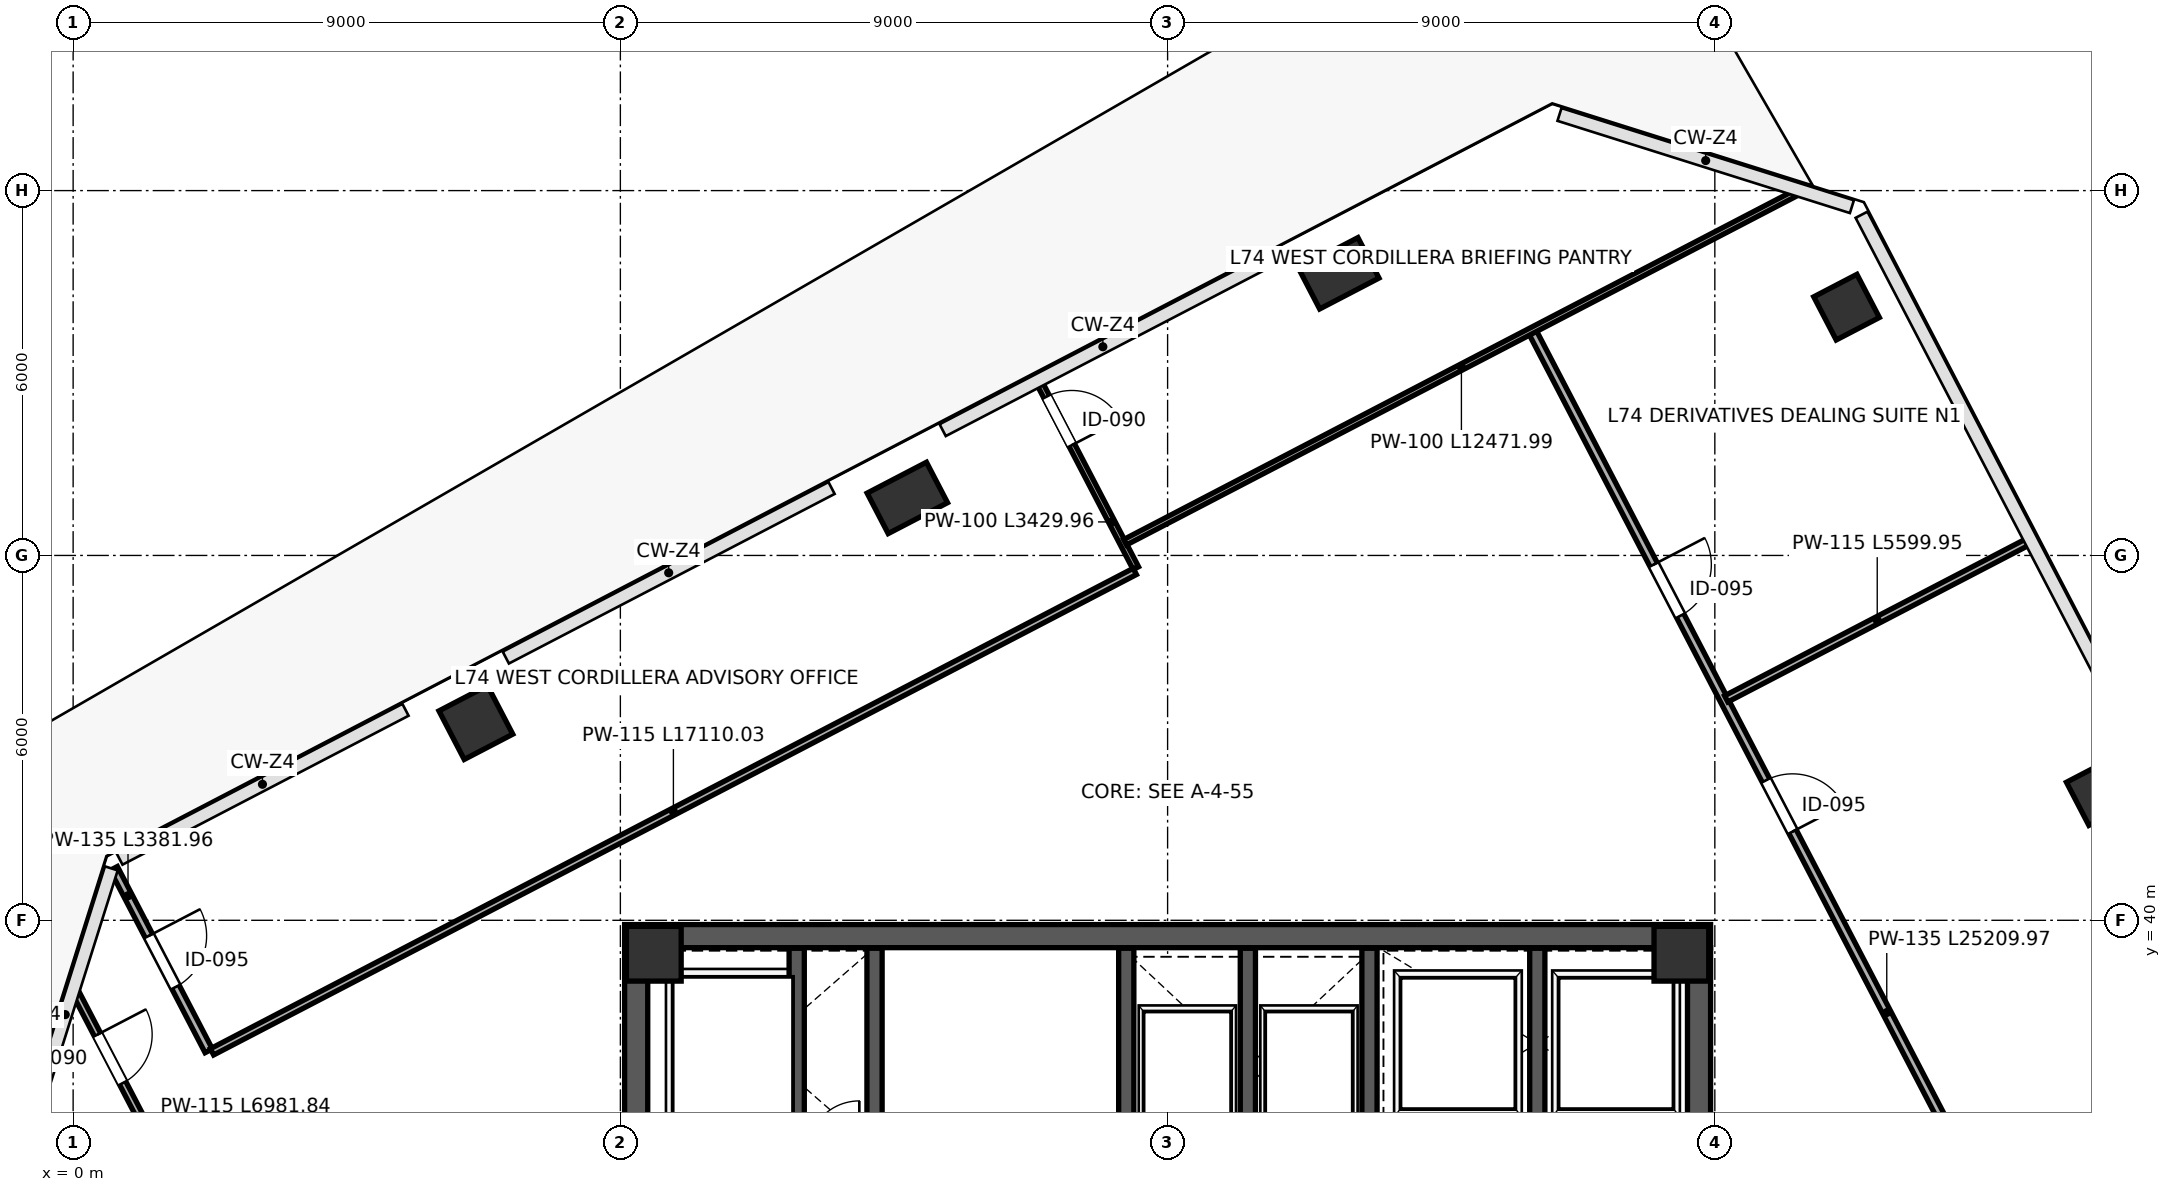
"""IFC4 building model, lengths in metres.
Left out: names, types, materials, properties, quantities, classifications, styles, units other than length and angle.
Written with IfcOpenShell. Run it as: python <this file> out.ifc"""

import sys

from ifc_helpers import new_model, si_unit, direction, frame, frame_2d, origin, origin_2d, place, context, subcontext, project, spatial, rectangle, extrude, source, transform, mapped, element, fill, save


model = new_model("IFC4")
c1 = context("Model", 3, precision=1e-05, world=origin(), true_north=direction((0.0, 1.0)))
c2 = subcontext(c1, "Body", "Model", "MODEL_VIEW")
j1 = project(units=[si_unit("LENGTHUNIT", "METRE"), si_unit("PLANEANGLEUNIT", "RADIAN")], contexts=[c1])
p1 = place(None, origin())
s1 = spatial("IfcSite", under=j1, at=p1, CompositionType="ELEMENT")
p2 = place(p1, origin())
s2 = spatial("IfcBuilding", under=s1, at=p2, CompositionType="ELEMENT")
p3 = place(p2, frame((0.0, 0.0, 328.2)))
s3 = spatial("IfcBuildingStorey", under=s2, at=p3, CompositionType="ELEMENT", Elevation=328.2)
m1 = source(origin(), c2, "Body", "SweptSolid", [
    extrude(rectangle(XDim=0.9, YDim=0.9, at=origin_2d()), origin(), (0.0, 0.0, 1.0), 4.198),
])
for number, where, z_axis, x_axis in (
    (1, (9.55, 39.45, 0.001), (0.0, 0.0, 1.0), (1.0, 0.0, 0.0)),
    (2, (26.45, 39.45, 0.001), (0.0, 0.0, 1.0), (1.0, 0.0, 0.0)),
):
    element("IfcColumn", number, at=place(p3, frame(where, z_axis=z_axis, x_axis=x_axis)), inside=s3, PredefinedType="COLUMN", context=c2, shape_type="MappedRepresentation", body=[
        mapped(m1, transform((0.0, 0.0, 0.0), scale=1.0)),
    ])
m2 = source(origin(), c2, "Body", "SweptSolid", [
    extrude(rectangle(XDim=0.8, YDim=0.8, at=origin_2d()), origin(), (0.0, 0.0, 1.0), 4.198),
])
for number, where, z_axis, x_axis in (
    (3, (29.167, 50.083, 0.001), (0.0, 0.0, 1.0), (-0.462, 0.887, 0.0)),
    (4, (33.322, 42.1, 0.001), (0.0, 0.0, 1.0), (-0.462, 0.887, 0.0)),
):
    element("IfcColumn", number, at=place(p3, frame(where, z_axis=z_axis, x_axis=x_axis)), inside=s3, PredefinedType="COLUMN", context=c2, shape_type="MappedRepresentation", body=[
        mapped(m2, transform((0.0, 0.0, 0.0), scale=1.0)),
    ])
m3 = source(origin(), c2, "Body", "SweptSolid", [
    extrude(rectangle(XDim=0.9, YDim=0.9, at=origin_2d()), origin(), (0.0, 0.0, 1.0), 4.198),
])
p4 = place(p3, frame((6.623, 43.252, 0.001), z_axis=(0.0, 0.0, 1.0), x_axis=(-0.461748613235, 0.887010833178, 0.0)))
e5 = element("IfcColumn", 5, at=p4, inside=s3, PredefinedType="COLUMN", context=c2, shape_type="MappedRepresentation", body=[
    mapped(m3, transform((0.0, 0.0, 0.0), scale=1.0)),
])
m4 = source(origin(), c2, "Body", "SweptSolid", [
    extrude(rectangle(XDim=0.75, YDim=1.1, at=origin_2d()), origin(), (0.0, 0.0, 1.0), 4.198),
])
for number, where, z_axis, x_axis in (
    (6, (13.719, 46.946, 0.001), (0.0, 0.0, 1.0), (-0.462, 0.887, 0.0)),
    (7, (20.816, 50.64, 0.001), (0.0, 0.0, 1.0), (-0.462, 0.887, 0.0)),
):
    element("IfcColumn", number, at=place(p3, frame(where, z_axis=z_axis, x_axis=x_axis)), inside=s3, PredefinedType="PILASTER", context=c2, shape_type="MappedRepresentation", body=[
        mapped(m4, transform((0.0, 0.0, 0.0), scale=1.0)),
    ])
p5 = place(p3, frame((9.26, 24.45, 0.0), z_axis=(0.0, 0.0, 1.0), x_axis=(0.0, 1.0, 0.0)))
e8 = element("IfcWall", 8, at=p5, inside=s3, PredefinedType="SHEAR", context=c2, shape_type="SweptSolid", body=[
    extrude(rectangle(XDim=15.1, YDim=0.38, at=frame_2d((7.55, 0.0))), origin(), (0.0, 0.0, 1.0), 3.96),
])
p6 = place(p5, frame((8.7, 0.0, 0.0)))
e9 = element("IfcOpeningElement", 9, at=p6, cuts=e8, PredefinedType="OPENING", context=c2, shape_type="SweptSolid", body=[
    extrude(rectangle(XDim=1.15, YDim=2.2, at=frame_2d((0.575, 1.1))), frame((0.0, 0.2, 0.0), z_axis=(0.0, -1.0, 0.0), x_axis=(1.0, 0.0, 0.0)), (0.0, 0.0, 1.0), 0.4),
])
p7 = place(p3, frame((26.74, 24.45, 0.0), z_axis=(0.0, 0.0, 1.0), x_axis=(0.0, 1.0, 0.0)))
e10 = element("IfcWall", 10, at=p7, inside=s3, PredefinedType="SHEAR", context=c2, shape_type="SweptSolid", body=[
    extrude(rectangle(XDim=15.1, YDim=0.38, at=frame_2d((7.55, 0.0))), origin(), (0.0, 0.0, 1.0), 3.96),
])
p8 = place(p7, frame((8.6, 0.0, 0.0)))
e11 = element("IfcOpeningElement", 11, at=p8, cuts=e10, PredefinedType="OPENING", context=c2, shape_type="SweptSolid", body=[
    extrude(rectangle(XDim=1.15, YDim=2.2, at=frame_2d((0.575, 1.1))), frame((0.0, 0.2, 0.0), z_axis=(0.0, -1.0, 0.0), x_axis=(1.0, 0.0, 0.0)), (0.0, 0.0, 1.0), 0.4),
])
p9 = place(p3, frame((9.07, 39.74, 0.0), z_axis=(0.0, 0.0, 1.0), x_axis=(1.0, 0.0, 0.0)))
e12 = element("IfcWall", 12, at=p9, inside=s3, PredefinedType="SHEAR", context=c2, shape_type="SweptSolid", body=[
    extrude(rectangle(XDim=17.86, YDim=0.38, at=frame_2d((8.93, 0.0))), origin(), (0.0, 0.0, 1.0), 3.96),
])
p10 = place(p3, frame((21.32, 32.12, 0.0), z_axis=(0.0, 0.0, 1.0), x_axis=(0.0, 1.0, 0.0)))
e13 = element("IfcWall", 13, at=p10, inside=s3, PredefinedType="SHEAR", context=c2, shape_type="SweptSolid", body=[
    extrude(rectangle(XDim=7.42, YDim=0.25, at=frame_2d((3.71, 0.0))), origin(), (0.0, 0.0, 1.0), 3.96),
])
p11 = place(p10, frame((1.4, 0.0, 0.0)))
e14 = element("IfcOpeningElement", 14, at=p11, cuts=e13, PredefinedType="OPENING", context=c2, shape_type="SweptSolid", body=[
    extrude(rectangle(XDim=1.15, YDim=2.2, at=frame_2d((0.575, 1.1))), frame((0.0, 0.135, 0.0), z_axis=(0.0, -1.0, 0.0), x_axis=(1.0, 0.0, 0.0)), (0.0, 0.0, 1.0), 0.27),
])
p12 = place(p3, frame((11.9, 36.31, 0.0), z_axis=(0.0, 0.0, 1.0), x_axis=(0.0, 1.0, 0.0)))
e15 = element("IfcWall", 15, at=p12, inside=s3, PredefinedType="SHEAR", context=c2, shape_type="SweptSolid", body=[
    extrude(rectangle(XDim=3.23, YDim=0.25, at=frame_2d((1.615, 0.0))), origin(), (0.0, 0.0, 1.0), 3.96),
])
p13 = place(p3, frame((24.08, 36.48, 0.0), z_axis=(0.0, 0.0, 1.0), x_axis=(0.0, 1.0, 0.0)))
e16 = element("IfcWall", 16, at=p13, inside=s3, PredefinedType="SHEAR", context=c2, shape_type="SweptSolid", body=[
    extrude(rectangle(XDim=3.06, YDim=0.25, at=frame_2d((1.53, 0.0))), origin(), (0.0, 0.0, 1.0), 3.96),
])
p14 = place(p3, frame((13.18, 36.2, 0.0), z_axis=(0.0, 0.0, 1.0), x_axis=(0.0, 1.0, 0.0)))
e17 = element("IfcWall", 17, at=p14, inside=s3, PredefinedType="SHEAR", context=c2, shape_type="SweptSolid", body=[
    extrude(rectangle(XDim=3.34, YDim=0.25, at=frame_2d((1.67, 0.0))), origin(), (0.0, 0.0, 1.0), 3.96),
])
for number, where, z_axis, x_axis in (
    (18, (17.32, 35.81, 0.0), (0.0, 0.0, 1.0), (0.0, 1.0, 0.0)),
    (19, (19.32, 35.81, 0.0), (0.0, 0.0, 1.0), (0.0, 1.0, 0.0)),
):
    element("IfcWall", number, at=place(p3, frame(where, z_axis=z_axis, x_axis=x_axis)), inside=s3, PredefinedType="SHEAR", context=c2, shape_type="SweptSolid", body=[
        extrude(rectangle(XDim=3.73, YDim=0.25, at=frame_2d((1.865, 0.0))), origin(), (0.0, 0.0, 1.0), 3.96),
    ])
p15 = place(p3, frame((0.031, 38.83, 0.0), z_axis=(0.0, 0.0, 1.0), x_axis=(0.461729249278, -0.887020913147, 0.0)))
e20 = element("IfcWall", 20, at=p15, inside=s3, PredefinedType="PARTITIONING", context=c2, shape_type="SweptSolid", body=[
    extrude(rectangle(XDim=6.982, YDim=0.115, at=frame_2d((3.491, 0.0))), origin(), (0.0, 0.0, 1.0), 3.96),
])
p16 = place(p15, frame((0.8, 0.0, 0.0)))
e21 = element("IfcOpeningElement", 21, at=p16, cuts=e20, PredefinedType="OPENING", context=c2, shape_type="SweptSolid", body=[
    extrude(rectangle(XDim=0.9, YDim=2.15, at=frame_2d((0.45, 1.075))), frame((0.0, 0.067, 0.0), z_axis=(0.0, -1.0, 0.0), x_axis=(1.0, 0.0, 0.0)), (0.0, 0.0, 1.0), 0.135),
])
p17 = place(p15, frame((5.36, 0.0, 0.0)))
e22 = element("IfcOpeningElement", 22, at=p17, cuts=e20, PredefinedType="OPENING", context=c2, shape_type="SweptSolid", body=[
    extrude(rectangle(XDim=0.95, YDim=2.15, at=frame_2d((0.475, 1.075))), frame((0.0, 0.067, 0.0), z_axis=(0.0, -1.0, 0.0), x_axis=(1.0, 0.0, 0.0)), (0.0, 0.0, 1.0), 0.135),
])
p18 = place(p3, frame((24.007, 49.664, 0.0), z_axis=(0.0, 0.0, 1.0), x_axis=(0.461753963132, -0.887008048178, 0.0)))
e23 = element("IfcWall", 23, at=p18, inside=s3, PredefinedType="PARTITIONING", context=c2, shape_type="SweptSolid", body=[
    extrude(rectangle(XDim=25.21, YDim=0.135, at=frame_2d((12.605, 0.0))), origin(), (0.0, 0.0, 1.0), 3.96),
])
p19 = place(p18, frame((4.3, 0.0, 0.0)))
e24 = element("IfcOpeningElement", 24, at=p19, cuts=e23, PredefinedType="OPENING", context=c2, shape_type="SweptSolid", body=[
    extrude(rectangle(XDim=0.95, YDim=2.15, at=frame_2d((0.475, 1.075))), frame((0.0, 0.078, 0.0), z_axis=(0.0, -1.0, 0.0), x_axis=(1.0, 0.0, 0.0)), (0.0, 0.0, 1.0), 0.155),
])
p20 = place(p18, frame((8.3, 0.0, 0.0)))
e25 = element("IfcOpeningElement", 25, at=p20, cuts=e23, PredefinedType="OPENING", context=c2, shape_type="SweptSolid", body=[
    extrude(rectangle(XDim=0.95, YDim=2.15, at=frame_2d((0.475, 1.075))), frame((0.0, 0.078, 0.0), z_axis=(0.0, -1.0, 0.0), x_axis=(1.0, 0.0, 0.0)), (0.0, 0.0, 1.0), 0.155),
])
p21 = place(p3, frame((27.187, 43.641, 0.0), z_axis=(0.0, 0.0, 1.0), x_axis=(0.886991844597, 0.461785088129, 0.0)))
e26 = element("IfcWall", 26, at=p21, inside=s3, PredefinedType="PARTITIONING", context=c2, shape_type="SweptSolid", body=[
    extrude(rectangle(XDim=5.6, YDim=0.115, at=frame_2d((2.8, 0.0))), origin(), (0.0, 0.0, 1.0), 3.295),
])
p22 = place(p3, frame((15.894, 48.833, 0.0), z_axis=(0.0, 0.0, 1.0), x_axis=(0.461760597426, -0.8870045945, 0.0)))
e27 = element("IfcWall", 27, at=p22, inside=s3, PredefinedType="PARTITIONING", context=c2, shape_type="SweptSolid", body=[
    extrude(rectangle(XDim=3.43, YDim=0.1, at=frame_2d((1.715, 0.0))), origin(), (0.0, 0.0, 1.0), 3.295),
])
p23 = place(p22, frame((0.25, 0.0, 0.0)))
e28 = element("IfcOpeningElement", 28, at=p23, cuts=e27, PredefinedType="OPENING", context=c2, shape_type="SweptSolid", body=[
    extrude(rectangle(XDim=0.9, YDim=2.15, at=frame_2d((0.45, 1.075))), frame((0.0, 0.06, 0.0), z_axis=(0.0, -1.0, 0.0), x_axis=(1.0, 0.0, 0.0)), (0.0, 0.0, 1.0), 0.12),
])
p24 = place(p3, frame((0.668, 40.853, 0.0), z_axis=(0.0, 0.0, 1.0), x_axis=(0.461736835827, -0.887016964009, 0.0)))
e29 = element("IfcWall", 29, at=p24, inside=s3, PredefinedType="PARTITIONING", context=c2, shape_type="SweptSolid", body=[
    extrude(rectangle(XDim=3.382, YDim=0.135, at=frame_2d((1.691, 0.0))), origin(), (0.0, 0.0, 1.0), 3.96),
])
p25 = place(p24, frame((1.25, 0.0, 0.0)))
e30 = element("IfcOpeningElement", 30, at=p25, cuts=e29, PredefinedType="OPENING", context=c2, shape_type="SweptSolid", body=[
    extrude(rectangle(XDim=0.95, YDim=2.15, at=frame_2d((0.475, 1.075))), frame((0.0, 0.078, 0.0), z_axis=(0.0, -1.0, 0.0), x_axis=(1.0, 0.0, 0.0)), (0.0, 0.0, 1.0), 0.155),
])
p26 = place(p3, frame((2.284, 37.836, 0.0), z_axis=(0.0, 0.0, 1.0), x_axis=(0.887016973522, 0.461736817553, 0.0)))
e31 = element("IfcWall", 31, at=p26, inside=s3, PredefinedType="PARTITIONING", context=c2, shape_type="SweptSolid", body=[
    extrude(rectangle(XDim=17.11, YDim=0.115, at=frame_2d((8.555, 0.0))), origin(), (0.0, 0.0, 1.0), 3.96),
])
p27 = place(p3, frame((17.301, 46.217, 0.0), z_axis=(0.0, 0.0, 1.0), x_axis=(0.887006461695, 0.461757010679, 0.0)))
e32 = element("IfcWall", 32, at=p27, inside=s3, PredefinedType="PARTITIONING", context=c2, shape_type="SweptSolid", body=[
    extrude(rectangle(XDim=12.472, YDim=0.1, at=frame_2d((6.236, 0.0))), origin(), (0.0, 0.0, 1.0), 3.96),
])
m5 = source(origin(), c2, "Body", "SweptSolid", [
    extrude(rectangle(XDim=0.9, YDim=2.15, at=frame_2d((0.45, 1.075))), frame((0.0, 0.025, 0.0), z_axis=(0.0, -1.0, 0.0), x_axis=(1.0, 0.0, 0.0)), (0.0, 0.0, 1.0), 0.05),
])
p28 = place(p16, origin())
e33 = element("IfcDoor", 33, at=p28, inside=s3, OperationType="SINGLE_SWING_LEFT", PredefinedType="DOOR", context=c2, shape_type="MappedRepresentation", body=[
    mapped(m5, transform((0.0, 0.0, 0.0), scale=1.0)),
])
fill(e21, e33)
m6 = source(origin(), c2, "Body", "SweptSolid", [
    extrude(rectangle(XDim=0.95, YDim=2.15, at=frame_2d((0.475, 1.075))), frame((0.0, 0.025, 0.0), z_axis=(0.0, -1.0, 0.0), x_axis=(1.0, 0.0, 0.0)), (0.0, 0.0, 1.0), 0.05),
])
p29 = place(p19, origin())
e34 = element("IfcDoor", 34, at=p29, inside=s3, OperationType="SINGLE_SWING_LEFT", PredefinedType="DOOR", context=c2, shape_type="MappedRepresentation", body=[
    mapped(m6, transform((0.0, 0.0, 0.0), scale=1.0)),
])
fill(e24, e34)
p30 = place(p20, origin())
e35 = element("IfcDoor", 35, at=p30, inside=s3, OperationType="SINGLE_SWING_RIGHT", PredefinedType="DOOR", context=c2, shape_type="MappedRepresentation", body=[
    mapped(m6, transform((0.0, 0.0, 0.0), scale=1.0)),
])
fill(e25, e35)
p31 = place(p25, origin())
e36 = element("IfcDoor", 36, at=p31, inside=s3, OperationType="SINGLE_SWING_LEFT", PredefinedType="DOOR", context=c2, shape_type="MappedRepresentation", body=[
    mapped(m6, transform((0.0, 0.0, 0.0), scale=1.0)),
])
fill(e30, e36)
p32 = place(p23, origin())
e37 = element("IfcDoor", 37, at=p32, inside=s3, OperationType="SINGLE_SWING_RIGHT", PredefinedType="DOOR", context=c2, shape_type="MappedRepresentation", body=[
    mapped(m5, transform((0.0, 0.0, 0.0), scale=1.0)),
])
fill(e28, e37)
save(model, sys.argv[1])
